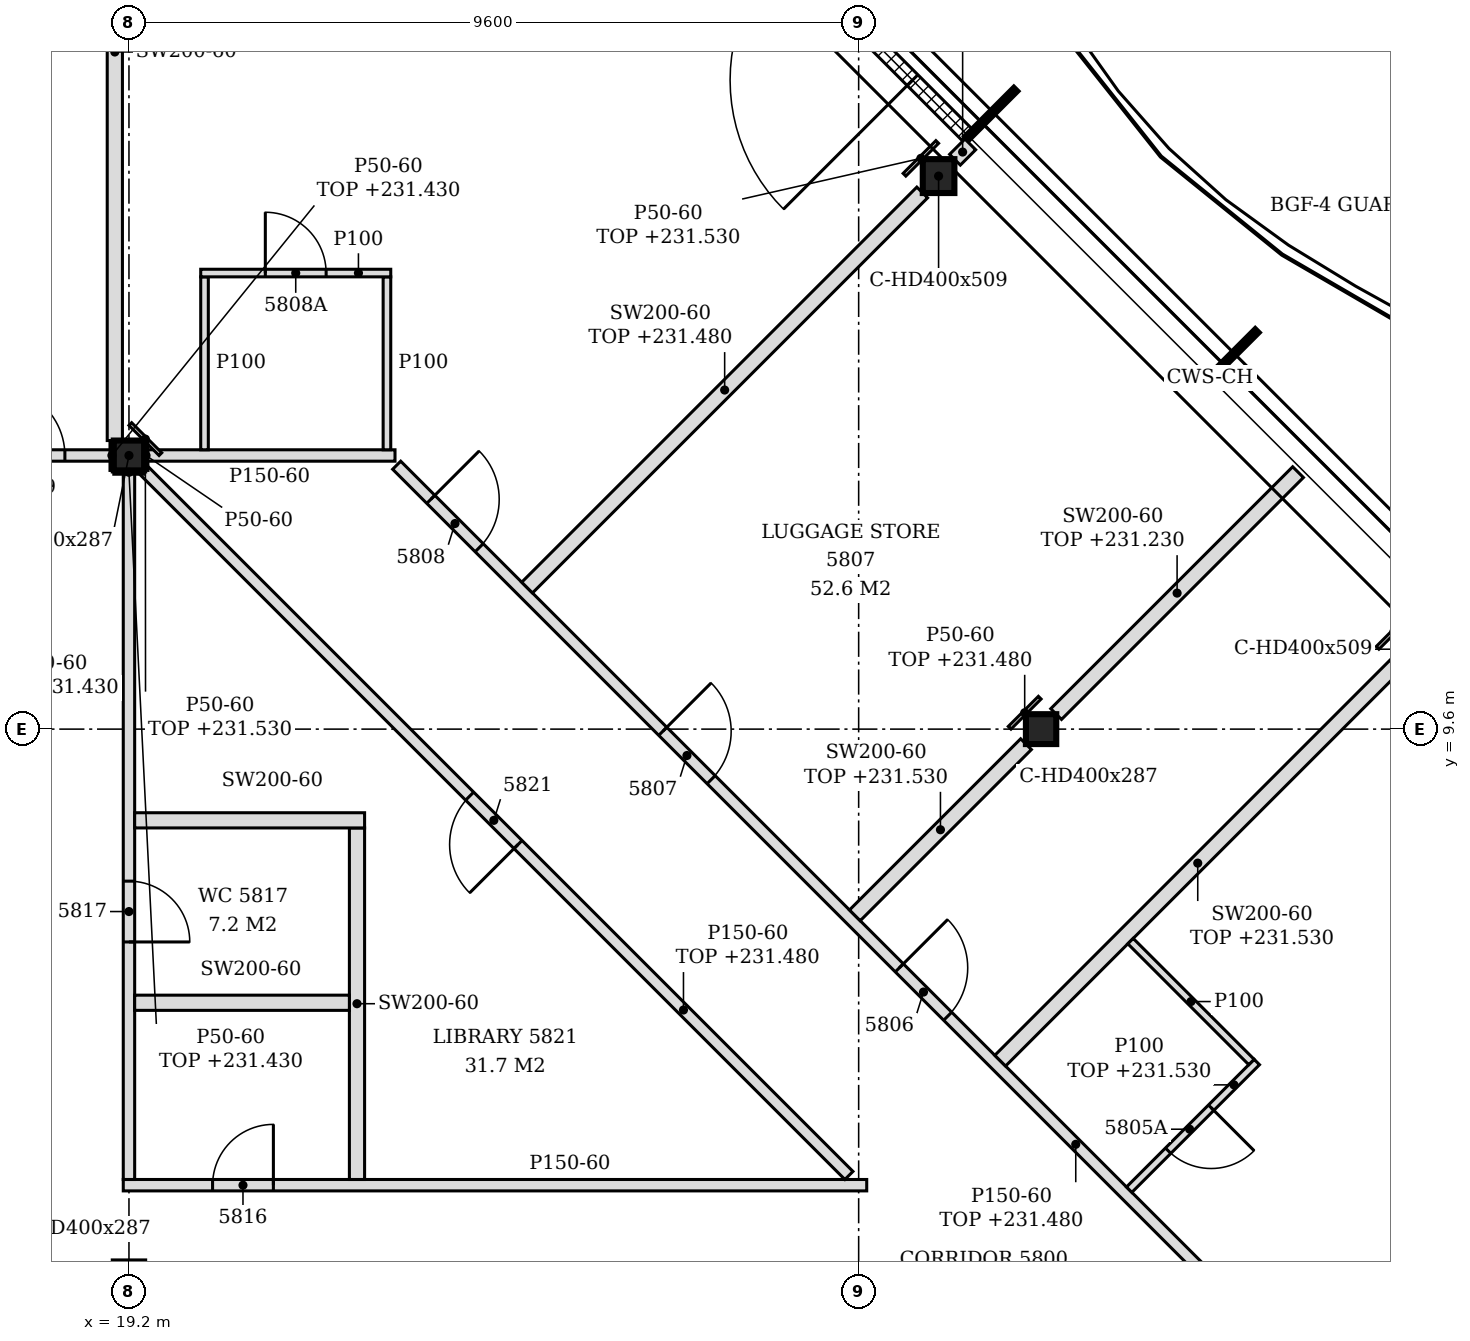
"""IFC4 building model, lengths in metres.
Left out: names, types, materials, properties, quantities, classifications, styles, units other than length and angle.
Written with IfcOpenShell. Run it as: python <this file> out.ifc"""

import sys

from ifc_helpers import new_model, si_unit, direction, frame, frame_2d, origin, origin_2d, place, context, subcontext, project, spatial, polyline, rectangle, i_section, outline, extrude, element, fill, save


model = new_model("IFC4")
c1 = context("Model", 3, precision=1e-05, world=origin(), true_north=direction((0.0, 1.0)))
c2 = subcontext(c1, "Body", "Model", "MODEL_VIEW")
j1 = project(units=[si_unit("LENGTHUNIT", "METRE"), si_unit("PLANEANGLEUNIT", "RADIAN")], contexts=[c1])
p1 = place(None, origin())
s1 = spatial("IfcSite", under=j1, at=p1, CompositionType="ELEMENT")
p2 = place(p1, origin())
s2 = spatial("IfcBuilding", under=s1, at=p2, CompositionType="ELEMENT")
p3 = place(p2, frame((0.0, 0.0, 228.6)))
s3 = spatial("IfcBuildingStorey", under=s2, at=p3, CompositionType="ELEMENT", Elevation=228.6)
p4 = place(p3, frame((29.852, 16.876, -0.15), z_axis=(0.0, 0.0, 1.0), x_axis=(1.0, 0.0, 0.0)))
e1 = element("IfcColumn", 1, at=p4, inside=s3, PredefinedType="COLUMN", context=c2, shape_type="SweptSolid", body=[
    extrude(i_section(OverallWidth=0.416, OverallDepth=0.446, WebThickness=0.039, FlangeThickness=0.063, FilletRadius=0.015, at=origin_2d()), origin(), (0.0, 0.0, 1.0), 3.6),
])
for number, where, z_axis, x_axis in (
    (2, (19.2, 13.2, -0.15), (0.0, 0.0, 1.0), (1.0, 0.0, 0.0)),
    (3, (31.2, 9.6, -0.15), (0.0, 0.0, 1.0), (1.0, 0.0, 0.0)),
):
    element("IfcColumn", number, at=place(p3, frame(where, z_axis=z_axis, x_axis=x_axis)), inside=s3, PredefinedType="COLUMN", context=c2, shape_type="SweptSolid", body=[
        extrude(i_section(OverallWidth=0.399, OverallDepth=0.393, WebThickness=0.023, FlangeThickness=0.037, FilletRadius=0.015, at=origin_2d()), origin(), (0.0, 0.0, 1.0), 3.6),
    ])
p5 = place(p3, frame((30.226, 17.42, 0.0), z_axis=(0.0, 0.0, 1.0), x_axis=(-0.707079231393, 0.707134329907, 0.0)))
e4 = element("IfcWall", 4, at=p5, inside=s3, PredefinedType="NOTDEFINED", context=c2, shape_type="SweptSolid", body=[
    extrude(rectangle(XDim=4.431, YDim=0.2, at=frame_2d((2.215, 0.0))), origin(), (0.0, 0.0, 1.0), 3.45),
])
p6 = place(p5, frame((1.015, 0.0, 0.0)))
e5 = element("IfcOpeningElement", 5, at=p6, cuts=e4, PredefinedType="OPENING", context=c2, shape_type="SweptSolid", body=[
    extrude(rectangle(XDim=2.4, YDim=2.4, at=frame_2d((1.2, 1.2))), frame((0.0, 0.11, 0.0), z_axis=(0.0, -1.0, 0.0), x_axis=(1.0, 0.0, 0.0)), (0.0, 0.0, 1.0), 0.22),
])
p7 = place(p3, frame((33.341, 2.453, 0.0), z_axis=(0.0, 0.0, 1.0), x_axis=(-0.707098652635, 0.707114909645, 0.0)))
e6 = element("IfcWall", 6, at=p7, inside=s3, PredefinedType="PARTITIONING", context=c2, shape_type="SweptSolid", body=[
    extrude(rectangle(XDim=15.018, YDim=0.15, at=frame_2d((7.509, 0.0))), origin(), (0.0, 0.0, 1.0), 2.88),
])
p8 = place(p7, frame((4.766, 0.0, 0.0)))
e7 = element("IfcOpeningElement", 7, at=p8, cuts=e6, PredefinedType="OPENING", context=c2, shape_type="SweptSolid", body=[
    extrude(rectangle(XDim=0.9, YDim=2.1, at=frame_2d((0.45, 1.05))), frame((0.0, 0.085, 0.0), z_axis=(0.0, -1.0, 0.0), x_axis=(1.0, 0.0, 0.0)), (0.0, 0.0, 1.0), 0.17),
])
p9 = place(p7, frame((9.167, 0.0, 0.0)))
e8 = element("IfcOpeningElement", 8, at=p9, cuts=e6, PredefinedType="OPENING", context=c2, shape_type="SweptSolid", body=[
    extrude(rectangle(XDim=0.9, YDim=2.1, at=frame_2d((0.45, 1.05))), frame((0.0, 0.085, 0.0), z_axis=(0.0, -1.0, 0.0), x_axis=(1.0, 0.0, 0.0)), (0.0, 0.0, 1.0), 0.17),
])
p10 = place(p7, frame((13.482, 0.0, 0.0)))
e9 = element("IfcOpeningElement", 9, at=p10, cuts=e6, PredefinedType="OPENING", context=c2, shape_type="SweptSolid", body=[
    extrude(rectangle(XDim=0.9, YDim=2.1, at=frame_2d((0.45, 1.05))), frame((0.0, 0.085, 0.0), z_axis=(0.0, -1.0, 0.0), x_axis=(1.0, 0.0, 0.0)), (0.0, 0.0, 1.0), 0.17),
])
p11 = place(p3, frame((32.359, 3.541, 0.0), z_axis=(0.0, 0.0, 1.0), x_axis=(0.707158179099, 0.707055379538, 0.0)))
e10 = element("IfcWall", 10, at=p11, inside=s3, PredefinedType="PARTITIONING", context=c2, shape_type="SweptSolid", body=[
    extrude(rectangle(XDim=2.375, YDim=0.1, at=frame_2d((1.188, 0.0))), origin(), (0.0, 0.0, 1.0), 2.93),
])
p12 = place(p11, frame((0.725, 0.0, 0.0)))
e11 = element("IfcOpeningElement", 11, at=p12, cuts=e10, PredefinedType="OPENING", context=c2, shape_type="SweptSolid", body=[
    extrude(rectangle(XDim=0.8, YDim=2.1, at=frame_2d((0.4, 1.05))), frame((0.0, 0.06, 0.0), z_axis=(0.0, -1.0, 0.0), x_axis=(1.0, 0.0, 0.0)), (0.0, 0.0, 1.0), 0.12),
])
p13 = place(p3, frame((19.125, 3.6, 0.0), z_axis=(0.0, 0.0, 1.0), x_axis=(1.0, 0.0, 0.0)))
e12 = element("IfcWall", 12, at=p13, inside=s3, PredefinedType="PARTITIONING", context=c2, shape_type="SweptSolid", body=[
    extrude(outline(polyline([(0.0, 0.0), (9.781, 0.0), (9.781, 3.45), (0.225, 3.45), (0.223, 2.83), (0.0, 2.83), (0.0, 0.0)])), frame((0.0, 0.075, 0.0), z_axis=(0.0, -1.0, 0.0), x_axis=(1.0, 0.0, 0.0)), (0.0, 0.0, 1.0), 0.15),
])
p14 = place(p13, frame((1.175, 0.0, 0.0)))
e13 = element("IfcOpeningElement", 13, at=p14, cuts=e12, PredefinedType="OPENING", context=c2, shape_type="SweptSolid", body=[
    extrude(rectangle(XDim=0.8, YDim=2.1, at=frame_2d((0.4, 1.05))), frame((0.0, 0.085, 0.0), z_axis=(0.0, -1.0, 0.0), x_axis=(1.0, 0.0, 0.0)), (0.0, 0.0, 1.0), 0.17),
])
p15 = place(p3, frame((19.2, 3.675, 0.0), z_axis=(0.0, 0.0, 1.0), x_axis=(0.0, 1.0, 0.0)))
e14 = element("IfcWall", 14, at=p15, inside=s3, PredefinedType="PARTITIONING", context=c2, shape_type="SweptSolid", body=[
    extrude(rectangle(XDim=9.328, YDim=0.15, at=frame_2d((4.664, 0.0))), origin(), (0.0, 0.0, 1.0), 2.83),
])
p16 = place(p15, frame((3.125, 0.0, 0.0)))
e15 = element("IfcOpeningElement", 15, at=p16, cuts=e14, PredefinedType="OPENING", context=c2, shape_type="SweptSolid", body=[
    extrude(rectangle(XDim=0.8, YDim=2.1, at=frame_2d((0.4, 1.05))), frame((0.0, 0.085, 0.0), z_axis=(0.0, -1.0, 0.0), x_axis=(1.0, 0.0, 0.0)), (0.0, 0.0, 1.0), 0.17),
])
p17 = place(p3, frame((22.2, 3.675, 0.0), z_axis=(0.0, 0.0, 1.0), x_axis=(0.0, 1.0, 0.0)))
e16 = element("IfcWall", 16, at=p17, inside=s3, PredefinedType="PARTITIONING", context=c2, shape_type="SweptSolid", body=[
    extrude(outline(polyline([(0.0, 0.0), (4.625, 0.0), (4.625, 3.45), (1.23, 3.45), (1.228, 2.88), (1.02, 2.88), (1.018, 3.45), (0.0, 3.45), (0.0, 0.0)])), frame((0.0, 0.1, 0.0), z_axis=(0.0, -1.0, 0.0), x_axis=(1.0, 0.0, 0.0)), (0.0, 0.0, 1.0), 0.2),
])
p18 = place(p3, frame((28.672, 3.728, 0.0), z_axis=(0.0, 0.0, 1.0), x_axis=(-0.707116088468, 0.707097473782, 0.0)))
e17 = element("IfcWall", 17, at=p18, inside=s3, PredefinedType="PARTITIONING", context=c2, shape_type="SweptSolid", body=[
    extrude(rectangle(XDim=13.115, YDim=0.15, at=frame_2d((6.558, 0.0))), origin(), (0.0, 0.0, 1.0), 2.88),
])
p19 = place(p18, frame((6.157, 0.0, 0.0)))
e18 = element("IfcOpeningElement", 18, at=p19, cuts=e17, PredefinedType="OPENING", context=c2, shape_type="SweptSolid", body=[
    extrude(rectangle(XDim=0.9, YDim=2.1, at=frame_2d((0.45, 1.05))), frame((0.0, 0.085, 0.0), z_axis=(0.0, -1.0, 0.0), x_axis=(1.0, 0.0, 0.0)), (0.0, 0.0, 1.0), 0.17),
])
p20 = place(p3, frame((30.662, 5.238, 0.0), z_axis=(0.0, 0.0, 1.0), x_axis=(0.707106781187, 0.707106781187, 0.0)))
e19 = element("IfcWall", 19, at=p20, inside=s3, PredefinedType="PARTITIONING", context=c2, shape_type="SweptSolid", body=[
    extrude(rectangle(XDim=7.351, YDim=0.2, at=frame_2d((3.676, 0.0))), origin(), (0.0, 0.0, 1.0), 2.93),
])
p21 = place(p3, frame((33.968, 5.22, 0.0), z_axis=(0.0, 0.0, 1.0), x_axis=(-0.707106781187, 0.707106781187, 0.0)))
e20 = element("IfcWall", 20, at=p21, inside=s3, PredefinedType="PARTITIONING", context=c2, shape_type="SweptSolid", body=[
    extrude(rectangle(XDim=2.25, YDim=0.1, at=frame_2d((1.125, 0.0))), origin(), (0.0, 0.0, 1.0), 3.45),
])
p22 = place(p3, frame((19.275, 6.0, 0.0), z_axis=(0.0, 0.0, 1.0), x_axis=(1.0, 0.0, 0.0)))
e21 = element("IfcWall", 21, at=p22, inside=s3, PredefinedType="PARTITIONING", context=c2, shape_type="SweptSolid", body=[
    extrude(outline(polyline([(0.0, 0.0), (2.825, 0.0), (2.825, 3.45), (0.075, 3.45), (0.073, 2.83), (0.0, 2.83), (0.0, 0.0)])), frame((0.0, 0.1, 0.0), z_axis=(0.0, -1.0, 0.0), x_axis=(1.0, 0.0, 0.0)), (0.0, 0.0, 1.0), 0.2),
])
p23 = place(p3, frame((28.75, 7.15, 0.0), z_axis=(0.0, 0.0, 1.0), x_axis=(0.7070684525, 0.707145107796, 0.0)))
e22 = element("IfcWall", 22, at=p23, inside=s3, PredefinedType="PARTITIONING", context=c2, shape_type="SweptSolid", body=[
    extrude(rectangle(XDim=3.185, YDim=0.2, at=frame_2d((1.592, 0.0))), origin(), (0.0, 0.0, 1.0), 2.93),
])
p24 = place(p3, frame((19.275, 8.4, 0.0), z_axis=(0.0, 0.0, 1.0), x_axis=(1.0, 0.0, 0.0)))
e23 = element("IfcWall", 23, at=p24, inside=s3, PredefinedType="PARTITIONING", context=c2, shape_type="SweptSolid", body=[
    extrude(outline(polyline([(0.0, 0.0), (3.025, 0.0), (3.025, 3.45), (0.075, 3.45), (0.073, 2.83), (0.0, 2.83), (0.0, 0.0)])), frame((0.0, 0.1, 0.0), z_axis=(0.0, -1.0, 0.0), x_axis=(1.0, 0.0, 0.0)), (0.0, 0.0, 1.0), 0.2),
])
p25 = place(p3, frame((31.398, 9.798, 0.0), z_axis=(0.0, 0.0, 1.0), x_axis=(0.707133900936, 0.707079660397, 0.0)))
e24 = element("IfcWall", 24, at=p25, inside=s3, PredefinedType="PARTITIONING", context=c2, shape_type="SweptSolid", body=[
    extrude(rectangle(XDim=4.501, YDim=0.2, at=frame_2d((2.25, 0.0))), origin(), (0.0, 0.0, 1.0), 2.63),
])
p26 = place(p3, frame((24.438, 11.462, 0.0), z_axis=(0.0, 0.0, 1.0), x_axis=(0.707090175614, 0.707123386369, 0.0)))
e25 = element("IfcWall", 25, at=p26, inside=s3, PredefinedType="PARTITIONING", context=c2, shape_type="SweptSolid", body=[
    extrude(rectangle(XDim=7.351, YDim=0.2, at=frame_2d((3.676, 0.0))), origin(), (0.0, 0.0, 1.0), 2.88),
])
p27 = place(p3, frame((7.399, 13.2, 0.0), z_axis=(0.0, 0.0, 1.0), x_axis=(1.0, 0.0, 0.0)))
e26 = element("IfcWall", 26, at=p27, inside=s3, PredefinedType="PARTITIONING", context=c2, shape_type="SweptSolid", body=[
    extrude(rectangle(XDim=11.601, YDim=0.15, at=frame_2d((5.801, 0.0))), origin(), (0.0, 0.0, 1.0), 2.83),
])
p28 = place(p27, frame((10.058, 0.0, 0.0)))
e27 = element("IfcOpeningElement", 27, at=p28, cuts=e26, PredefinedType="OPENING", context=c2, shape_type="SweptSolid", body=[
    extrude(rectangle(XDim=0.9, YDim=2.1, at=frame_2d((0.45, 1.05))), frame((0.0, 0.085, 0.0), z_axis=(0.0, -1.0, 0.0), x_axis=(1.0, 0.0, 0.0)), (0.0, 0.0, 1.0), 0.17),
])
p29 = place(p3, frame((19.399, 13.2, 0.0), z_axis=(0.0, 0.0, 1.0), x_axis=(1.0, 0.0, 0.0)))
e28 = element("IfcWall", 28, at=p29, inside=s3, PredefinedType="PARTITIONING", context=c2, shape_type="SweptSolid", body=[
    extrude(rectangle(XDim=3.301, YDim=0.15, at=frame_2d((1.65, 0.0))), origin(), (0.0, 0.0, 1.0), 3.45),
])
for number, where, z_axis, x_axis in (
    (29, (20.194, 13.275, 0.0), (0.0, 0.0, 1.0), (0.0, 1.0, 0.0)),
    (30, (22.594, 13.275, 0.0), (0.0, 0.0, 1.0), (0.0, 1.0, 0.0)),
):
    element("IfcWall", number, at=place(p3, frame(where, z_axis=z_axis, x_axis=x_axis)), inside=s3, PredefinedType="PARTITIONING", context=c2, shape_type="SweptSolid", body=[
        extrude(outline(polyline([(0.0, 0.0), (2.275, 0.0), (2.275, 3.45), (1.23, 3.45), (1.228, 2.88), (1.02, 2.88), (1.018, 3.45), (0.0, 3.45), (0.0, 0.0)])), frame((0.0, 0.05, 0.0), z_axis=(0.0, -1.0, 0.0), x_axis=(1.0, 0.0, 0.0)), (0.0, 0.0, 1.0), 0.1),
    ])
p30 = place(p3, frame((19.014, 13.396, 0.0), z_axis=(0.0, 0.0, 1.0), x_axis=(0.0, 1.0, 0.0)))
e31 = element("IfcWall", 31, at=p30, inside=s3, PredefinedType="PARTITIONING", context=c2, shape_type="SweptSolid", body=[
    extrude(outline(polyline([(0.0, 0.0), (10.224, 0.0), (10.223, 3.45), (9.854, 3.45), (9.852, 2.93), (5.908, 2.93), (5.906, 2.88), (5.698, 2.88), (5.697, 2.93), (0.003, 2.93), (0.001, 3.45), (0.0, 3.45), (0.0, 0.0)])), frame((0.0, 0.1, 0.0), z_axis=(0.0, -1.0, 0.0), x_axis=(1.0, 0.0, 0.0)), (0.0, 0.0, 1.0), 0.2),
])
p31 = place(p3, frame((20.144, 15.6, 0.0), z_axis=(0.0, 0.0, 1.0), x_axis=(1.0, 0.0, 0.0)))
e32 = element("IfcWall", 32, at=p31, inside=s3, PredefinedType="PARTITIONING", context=c2, shape_type="SweptSolid", body=[
    extrude(rectangle(XDim=2.5, YDim=0.1, at=frame_2d((1.25, 0.0))), origin(), (0.0, 0.0, 1.0), 3.45),
])
p32 = place(p31, frame((0.85, 0.0, 0.0)))
e33 = element("IfcOpeningElement", 33, at=p32, cuts=e32, PredefinedType="OPENING", context=c2, shape_type="SweptSolid", body=[
    extrude(rectangle(XDim=0.8, YDim=2.1, at=frame_2d((0.4, 1.05))), frame((0.0, 0.06, 0.0), z_axis=(0.0, -1.0, 0.0), x_axis=(1.0, 0.0, 0.0)), (0.0, 0.0, 1.0), 0.12),
])
p33 = place(p3, frame((30.067, 17.091, 0.0), z_axis=(0.0, 0.0, 1.0), x_axis=(0.707106781187, 0.707106781187, 0.0)))
e34 = element("IfcWall", 34, at=p33, inside=s3, PredefinedType="PARTITIONING", context=c2, shape_type="SweptSolid", body=[
    extrude(rectangle(XDim=0.285, YDim=0.2, at=frame_2d((0.143, 0.0))), origin(), (0.0, 0.0, 1.0), 3.45),
])
p34 = place(p3, frame((18.976, 13.003, 0.0), z_axis=(0.0, 0.0, 1.0), x_axis=(0.0, 1.0, 0.0)))
e35 = element("IfcWall", 35, at=p34, inside=s3, PredefinedType="PARTITIONING", context=c2, shape_type="SweptSolid", body=[
    extrude(rectangle(XDim=0.393, YDim=0.05, at=frame_2d((0.197, 0.0))), origin(), (0.0, 0.0, 1.0), 2.83),
])
p35 = place(p3, frame((19.614, 13.218, 0.0), z_axis=(0.0, 0.0, 1.0), x_axis=(-0.707106781187, 0.707106781187, 0.0)))
e36 = element("IfcWall", 36, at=p35, inside=s3, PredefinedType="PARTITIONING", context=c2, shape_type="SweptSolid", body=[
    extrude(rectangle(XDim=0.56, YDim=0.05, at=frame_2d((0.28, 0.0))), origin(), (0.0, 0.0, 1.0), 2.93),
])
p36 = place(p3, frame((35.627, 10.669, 0.0), z_axis=(0.0, 0.0, 1.0), x_axis=(0.707307009627, 0.706906496032, 0.0)))
e37 = element("IfcWall", 37, at=p36, inside=s3, PredefinedType="PARTITIONING", context=c2, shape_type="SweptSolid", body=[
    extrude(rectangle(XDim=0.61, YDim=0.05, at=frame_2d((0.305, 0.0))), origin(), (0.0, 0.0, 1.0), 2.63),
])
p37 = place(p3, frame((30.786, 9.618, 0.0), z_axis=(0.0, 0.0, 1.0), x_axis=(0.707106781187, 0.707106781187, 0.0)))
e38 = element("IfcWall", 38, at=p37, inside=s3, PredefinedType="PARTITIONING", context=c2, shape_type="SweptSolid", body=[
    extrude(rectangle(XDim=0.56, YDim=0.05, at=frame_2d((0.28, 0.0))), origin(), (0.0, 0.0, 1.0), 2.88),
])
p38 = place(p3, frame((29.403, 16.893, 0.0), z_axis=(0.0, 0.0, 1.0), x_axis=(0.706906496032, 0.707307009627, 0.0)))
e39 = element("IfcWall", 39, at=p38, inside=s3, PredefinedType="PARTITIONING", context=c2, shape_type="SweptSolid", body=[
    extrude(rectangle(XDim=0.61, YDim=0.05, at=frame_2d((0.305, 0.0))), origin(), (0.0, 0.0, 1.0), 2.93),
])
p39 = place(p3, frame((19.0, 12.979, 0.0), z_axis=(0.0, 0.0, 1.0), x_axis=(1.0, 0.0, 0.0)))
e40 = element("IfcWall", 40, at=p39, inside=s3, PredefinedType="PARTITIONING", context=c2, shape_type="SweptSolid", body=[
    extrude(rectangle(XDim=0.399, YDim=0.05, at=frame_2d((0.199, 0.0))), origin(), (0.0, 0.0, 1.0), 2.83),
])
p40 = place(p3, frame((19.425, 13.003, 0.0), z_axis=(0.0, 0.0, 1.0), x_axis=(0.0, 1.0, 0.0)))
e41 = element("IfcWall", 41, at=p40, inside=s3, PredefinedType="PARTITIONING", context=c2, shape_type="SweptSolid", body=[
    extrude(rectangle(XDim=0.393, YDim=0.05, at=frame_2d((0.197, 0.0))), origin(), (0.0, 0.0, 1.0), 3.45),
])
p41 = place(p6, origin())
e42 = element("IfcDoor", 42, at=p41, inside=s3, OperationType="SINGLE_SWING_LEFT", PredefinedType="DOOR", context=c2, shape_type="SweptSolid", body=[
    extrude(rectangle(XDim=2.4, YDim=2.4, at=frame_2d((1.2, 1.2))), frame((0.0, 0.025, 0.0), z_axis=(0.0, -1.0, 0.0), x_axis=(1.0, 0.0, 0.0)), (0.0, 0.0, 1.0), 0.05),
])
fill(e5, e42)
p42 = place(p12, frame((0.8, 0.0, 0.0), z_axis=(0.0, 0.0, 1.0), x_axis=(-1.0, 0.0, 0.0)))
e43 = element("IfcDoor", 43, at=p42, inside=s3, OperationType="SINGLE_SWING_LEFT", PredefinedType="DOOR", context=c2, shape_type="SweptSolid", body=[
    extrude(rectangle(XDim=0.8, YDim=2.1, at=frame_2d((0.4, 1.05))), frame((0.0, 0.025, 0.0), z_axis=(0.0, -1.0, 0.0), x_axis=(1.0, 0.0, 0.0)), (0.0, 0.0, 1.0), 0.05),
])
fill(e11, e43)
p43 = place(p8, frame((0.9, 0.0, 0.0), z_axis=(0.0, 0.0, 1.0), x_axis=(-1.0, 0.0, 0.0)))
e44 = element("IfcDoor", 44, at=p43, inside=s3, OperationType="SINGLE_SWING_LEFT", PredefinedType="DOOR", context=c2, shape_type="SweptSolid", body=[
    extrude(rectangle(XDim=0.9, YDim=2.1, at=frame_2d((0.45, 1.05))), frame((0.0, 0.025, 0.0), z_axis=(0.0, -1.0, 0.0), x_axis=(1.0, 0.0, 0.0)), (0.0, 0.0, 1.0), 0.05),
])
fill(e7, e44)
p44 = place(p9, frame((0.9, 0.0, 0.0), z_axis=(0.0, 0.0, 1.0), x_axis=(-1.0, 0.0, 0.0)))
e45 = element("IfcDoor", 45, at=p44, inside=s3, OperationType="SINGLE_SWING_LEFT", PredefinedType="DOOR", context=c2, shape_type="SweptSolid", body=[
    extrude(rectangle(XDim=0.9, YDim=2.1, at=frame_2d((0.45, 1.05))), frame((0.0, 0.025, 0.0), z_axis=(0.0, -1.0, 0.0), x_axis=(1.0, 0.0, 0.0)), (0.0, 0.0, 1.0), 0.05),
])
fill(e8, e45)
p45 = place(p10, frame((0.9, 0.0, 0.0), z_axis=(0.0, 0.0, 1.0), x_axis=(-1.0, 0.0, 0.0)))
e46 = element("IfcDoor", 46, at=p45, inside=s3, OperationType="SINGLE_SWING_LEFT", PredefinedType="DOOR", context=c2, shape_type="SweptSolid", body=[
    extrude(rectangle(XDim=0.9, YDim=2.1, at=frame_2d((0.45, 1.05))), frame((0.0, 0.025, 0.0), z_axis=(0.0, -1.0, 0.0), x_axis=(1.0, 0.0, 0.0)), (0.0, 0.0, 1.0), 0.05),
])
fill(e9, e46)
p46 = place(p32, origin())
e47 = element("IfcDoor", 47, at=p46, inside=s3, OperationType="SINGLE_SWING_LEFT", PredefinedType="DOOR", context=c2, shape_type="SweptSolid", body=[
    extrude(rectangle(XDim=0.8, YDim=2.1, at=frame_2d((0.4, 1.05))), frame((0.0, 0.025, 0.0), z_axis=(0.0, -1.0, 0.0), x_axis=(1.0, 0.0, 0.0)), (0.0, 0.0, 1.0), 0.05),
])
fill(e33, e47)
p47 = place(p28, origin())
e48 = element("IfcDoor", 48, at=p47, inside=s3, OperationType="SINGLE_SWING_LEFT", PredefinedType="DOOR", context=c2, shape_type="SweptSolid", body=[
    extrude(rectangle(XDim=0.9, YDim=2.1, at=frame_2d((0.45, 1.05))), frame((0.0, 0.025, 0.0), z_axis=(0.0, -1.0, 0.0), x_axis=(1.0, 0.0, 0.0)), (0.0, 0.0, 1.0), 0.05),
])
fill(e27, e48)
p48 = place(p14, origin())
e49 = element("IfcDoor", 49, at=p48, inside=s3, OperationType="SINGLE_SWING_RIGHT", PredefinedType="DOOR", context=c2, shape_type="SweptSolid", body=[
    extrude(rectangle(XDim=0.8, YDim=2.1, at=frame_2d((0.4, 1.05))), frame((0.0, 0.025, 0.0), z_axis=(0.0, -1.0, 0.0), x_axis=(1.0, 0.0, 0.0)), (0.0, 0.0, 1.0), 0.05),
])
fill(e13, e49)
p49 = place(p16, frame((0.8, 0.0, 0.0), z_axis=(0.0, 0.0, 1.0), x_axis=(-1.0, 0.0, 0.0)))
e50 = element("IfcDoor", 50, at=p49, inside=s3, OperationType="SINGLE_SWING_RIGHT", PredefinedType="DOOR", context=c2, shape_type="SweptSolid", body=[
    extrude(rectangle(XDim=0.8, YDim=2.1, at=frame_2d((0.4, 1.05))), frame((0.0, 0.025, 0.0), z_axis=(0.0, -1.0, 0.0), x_axis=(1.0, 0.0, 0.0)), (0.0, 0.0, 1.0), 0.05),
])
fill(e15, e50)
p50 = place(p19, origin())
e51 = element("IfcDoor", 51, at=p50, inside=s3, OperationType="SINGLE_SWING_LEFT", PredefinedType="DOOR", context=c2, shape_type="SweptSolid", body=[
    extrude(rectangle(XDim=0.9, YDim=2.1, at=frame_2d((0.45, 1.05))), frame((0.0, 0.025, 0.0), z_axis=(0.0, -1.0, 0.0), x_axis=(1.0, 0.0, 0.0)), (0.0, 0.0, 1.0), 0.05),
])
fill(e18, e51)
save(model, sys.argv[1])
